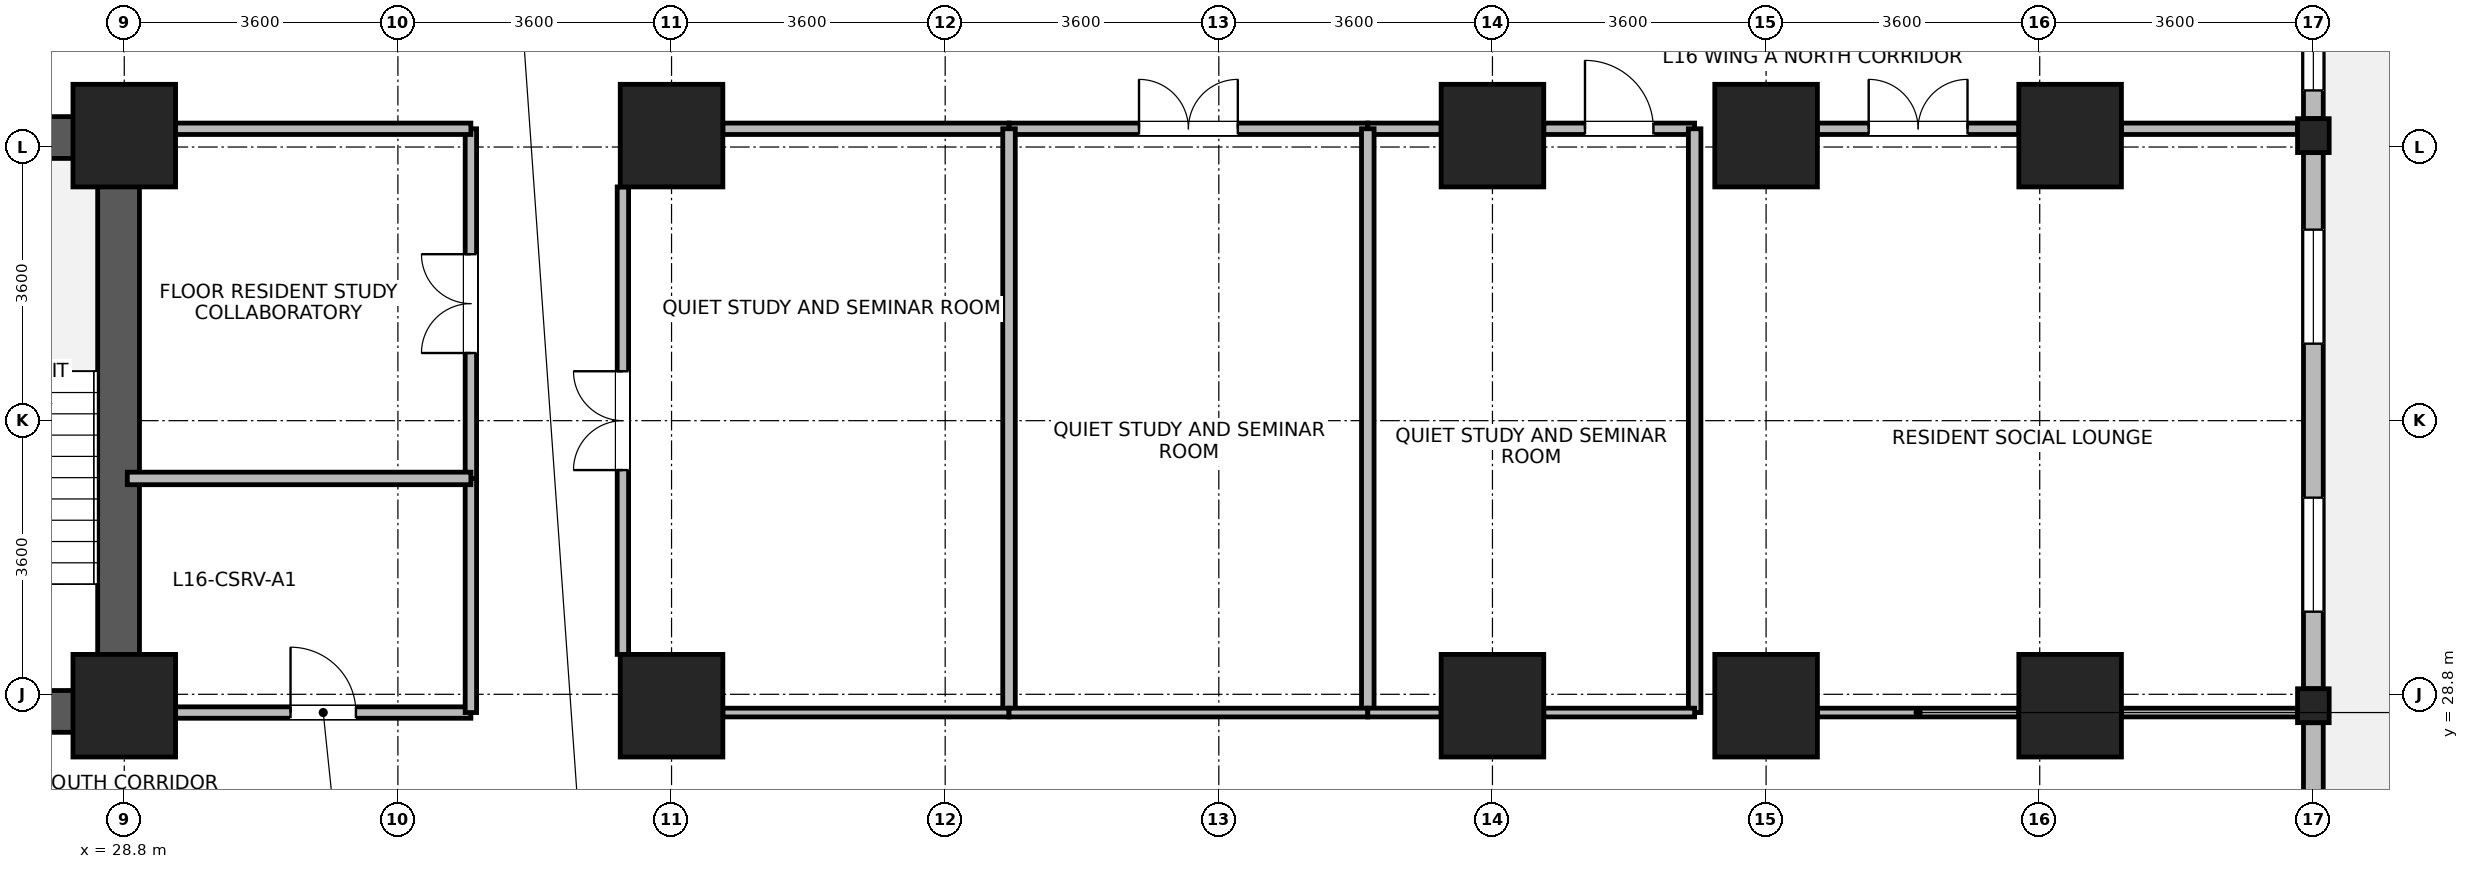
"""IFC4 building model, lengths in metres.
Left out: names, types, materials, properties, quantities, classifications, styles, units other than length and angle.
Written with IfcOpenShell. Run it as: python <this file> out.ifc"""

import sys

from ifc_helpers import new_model, si_unit, direction, frame, frame_2d, origin, origin_2d, place, context, subcontext, project, spatial, rectangle, i_section, extrude, source, transform, mapped, element, fill, save


model = new_model("IFC4")
c1 = context("Model", 3, precision=1e-05, world=origin(), true_north=direction((0.0, 1.0)))
c2 = subcontext(c1, "Body", "Model", "MODEL_VIEW")
j1 = project(units=[si_unit("LENGTHUNIT", "METRE"), si_unit("PLANEANGLEUNIT", "RADIAN")], contexts=[c1])
p1 = place(None, origin())
s1 = spatial("IfcSite", under=j1, at=p1, CompositionType="ELEMENT")
p2 = place(p1, origin())
s2 = spatial("IfcBuilding", under=s1, at=p2, CompositionType="ELEMENT")
p3 = place(p2, frame((0.0, 0.0, 66.0)))
s3 = spatial("IfcBuildingStorey", under=s2, at=p3, CompositionType="ELEMENT", Elevation=66.0)
p4 = place(p3, frame((28.725, 28.3, 0.0), z_axis=(0.0, 0.0, 1.0), x_axis=(0.0, 1.0, 0.0)))
e1 = element("IfcWall", 1, at=p4, inside=s3, PredefinedType="SHEAR", context=c2, shape_type="SweptSolid", body=[
    extrude(rectangle(XDim=8.1, YDim=0.55, at=frame_2d((4.05, 0.0))), origin(), (0.0, 0.0, 1.0), 3.45),
])
for number, where, z_axis, x_axis in (
    (2, (25.25, 28.575, 0.0), (0.0, 0.0, 1.0), (1.0, 0.0, 0.0)),
    (3, (25.25, 36.125, 0.0), (0.0, 0.0, 1.0), (1.0, 0.0, 0.0)),
):
    element("IfcWall", number, at=place(p3, frame(where, z_axis=z_axis, x_axis=x_axis)), inside=s3, PredefinedType="SHEAR", context=c2, shape_type="SweptSolid", body=[
        extrude(rectangle(XDim=3.2, YDim=0.55, at=frame_2d((1.6, 0.0))), origin(), (0.0, 0.0, 1.0), 3.45),
    ])
m1 = source(origin(), c2, "Body", "SweptSolid", [
    extrude(rectangle(XDim=1.35, YDim=1.35, at=origin_2d()), origin(), (0.0, 0.0, 1.0), 3.7),
])
for number, where, z_axis, x_axis in (
    (4, (28.8, 28.65, 0.0), (0.0, 0.0, 1.0), (1.0, 0.0, 0.0)),
    (5, (28.8, 36.15, 0.0), (0.0, 0.0, 1.0), (1.0, 0.0, 0.0)),
    (6, (36.0, 28.65, 0.0), (0.0, 0.0, 1.0), (1.0, 0.0, 0.0)),
    (7, (36.0, 36.15, 0.0), (0.0, 0.0, 1.0), (1.0, 0.0, 0.0)),
    (8, (46.8, 28.65, 0.0), (0.0, 0.0, 1.0), (1.0, 0.0, 0.0)),
    (9, (46.8, 36.15, 0.0), (0.0, 0.0, 1.0), (1.0, 0.0, 0.0)),
    (10, (50.4, 28.65, 0.0), (0.0, 0.0, 1.0), (1.0, 0.0, 0.0)),
    (11, (50.4, 36.15, 0.0), (0.0, 0.0, 1.0), (1.0, 0.0, 0.0)),
    (12, (54.4, 28.65, 0.0), (0.0, 0.0, 1.0), (1.0, 0.0, 0.0)),
    (13, (54.4, 36.15, 0.0), (0.0, 0.0, 1.0), (1.0, 0.0, 0.0)),
):
    element("IfcColumn", number, at=place(p3, frame(where, z_axis=z_axis, x_axis=x_axis)), inside=s3, PredefinedType="COLUMN", context=c2, shape_type="MappedRepresentation", body=[
        mapped(m1, transform((0.0, 0.0, 0.0), x_axis=(1.0, 0.0, 0.0), y_axis=(0.0, 1.0, 0.0), z_axis=(0.0, 0.0, 1.0), scale=1.0)),
    ])
m2 = source(origin(), c2, "Body", "SweptSolid", [
    extrude(i_section(OverallWidth=0.416, OverallDepth=0.446, WebThickness=0.029, FlangeThickness=0.04, FilletRadius=0.015, at=origin_2d()), origin(), (0.0, 0.0, 1.0), 3.7),
])
for number, where, z_axis, x_axis in (
    (14, (57.6, 28.65, 0.0), (0.0, 0.0, 1.0), (1.0, 0.0, 0.0)),
    (15, (57.6, 36.15, 0.0), (0.0, 0.0, 1.0), (1.0, 0.0, 0.0)),
):
    element("IfcColumn", number, at=place(p3, frame(where, z_axis=z_axis, x_axis=x_axis)), inside=s3, PredefinedType="COLUMN", context=c2, shape_type="MappedRepresentation", body=[
        mapped(m2, transform((0.0, 0.0, 0.0), x_axis=(1.0, 0.0, 0.0), y_axis=(0.0, 1.0, 0.0), z_axis=(0.0, 0.0, 1.0), scale=1.0)),
    ])
p5 = place(p3, frame((57.6, 28.426, 0.0), z_axis=(0.0, 0.0, 1.0), x_axis=(0.0, -1.0, 0.0)))
e16 = element("IfcWall", 16, at=p5, inside=s3, PredefinedType="STANDARD", context=c2, shape_type="SweptSolid", body=[
    extrude(rectangle(XDim=6.602, YDim=0.26, at=frame_2d((3.301, 0.0))), origin(), (0.0, 0.0, 1.0), 2.93),
])
p6 = place(p5, frame((4.201, 0.0, 0.85)))
e17 = element("IfcOpeningElement", 17, at=p6, cuts=e16, PredefinedType="OPENING", context=c2, shape_type="SweptSolid", body=[
    extrude(rectangle(XDim=1.5, YDim=1.85, at=frame_2d((0.75, 0.925))), frame((0.0, 0.14, 0.0), z_axis=(0.0, -1.0, 0.0), x_axis=(1.0, 0.0, 0.0)), (0.0, 0.0, 1.0), 0.28),
])
p7 = place(p5, frame((2.826, 0.0, 0.85)))
e18 = element("IfcOpeningElement", 18, at=p7, cuts=e16, PredefinedType="OPENING", context=c2, shape_type="SweptSolid", body=[
    extrude(rectangle(XDim=0.95, YDim=1.75, at=frame_2d((0.475, 0.875))), frame((0.0, 0.14, 0.0), z_axis=(0.0, -1.0, 0.0), x_axis=(1.0, 0.0, 0.0)), (0.0, 0.0, 1.0), 0.28),
])
p8 = place(p3, frame((57.6, 35.926, 0.0), z_axis=(0.0, 0.0, 1.0), x_axis=(0.0, -1.0, 0.0)))
e19 = element("IfcWall", 19, at=p8, inside=s3, PredefinedType="STANDARD", context=c2, shape_type="SweptSolid", body=[
    extrude(rectangle(XDim=7.052, YDim=0.26, at=frame_2d((3.526, 0.0))), origin(), (0.0, 0.0, 1.0), 2.93),
])
p9 = place(p8, frame((1.013, 0.0, 0.85)))
e20 = element("IfcOpeningElement", 20, at=p9, cuts=e19, PredefinedType="OPENING", context=c2, shape_type="SweptSolid", body=[
    extrude(rectangle(XDim=1.5, YDim=1.85, at=frame_2d((0.75, 0.925))), frame((0.0, 0.14, 0.0), z_axis=(0.0, -1.0, 0.0), x_axis=(1.0, 0.0, 0.0)), (0.0, 0.0, 1.0), 0.28),
])
p10 = place(p8, frame((4.539, 0.0, 0.85)))
e21 = element("IfcOpeningElement", 21, at=p10, cuts=e19, PredefinedType="OPENING", context=c2, shape_type="SweptSolid", body=[
    extrude(rectangle(XDim=1.5, YDim=1.85, at=frame_2d((0.75, 0.925))), frame((0.0, 0.14, 0.0), z_axis=(0.0, -1.0, 0.0), x_axis=(1.0, 0.0, 0.0)), (0.0, 0.0, 1.0), 0.28),
])
p11 = place(p3, frame((57.6, 39.73, 0.0), z_axis=(0.0, 0.0, 1.0), x_axis=(0.0, -1.0, 0.0)))
e22 = element("IfcWall", 22, at=p11, inside=s3, PredefinedType="STANDARD", context=c2, shape_type="SweptSolid", body=[
    extrude(rectangle(XDim=3.356, YDim=0.26, at=frame_2d((1.678, 0.0))), origin(), (0.0, 0.0, 1.0), 3.43),
])
p12 = place(p11, frame((2.035, 0.0, 0.85)))
e23 = element("IfcOpeningElement", 23, at=p12, cuts=e22, PredefinedType="OPENING", context=c2, shape_type="SweptSolid", body=[
    extrude(rectangle(XDim=0.95, YDim=1.75, at=frame_2d((0.475, 0.875))), frame((0.0, 0.14, 0.0), z_axis=(0.0, -1.0, 0.0), x_axis=(1.0, 0.0, 0.0)), (0.0, 0.0, 1.0), 0.28),
])
p13 = place(p11, frame((0.263, 0.0, 0.85)))
e24 = element("IfcOpeningElement", 24, at=p13, cuts=e22, PredefinedType="OPENING", context=c2, shape_type="SweptSolid", body=[
    extrude(rectangle(XDim=0.95, YDim=1.75, at=frame_2d((0.475, 0.875))), frame((0.0, 0.14, 0.0), z_axis=(0.0, -1.0, 0.0), x_axis=(1.0, 0.0, 0.0)), (0.0, 0.0, 1.0), 0.28),
])
p14 = place(p3, frame((51.075, 36.24, 0.0), z_axis=(0.0, 0.0, 1.0), x_axis=(1.0, 0.0, 0.0)))
e25 = element("IfcWall", 25, at=p14, inside=s3, PredefinedType="PARTITIONING", context=c2, shape_type="SweptSolid", body=[
    extrude(rectangle(XDim=2.65, YDim=0.15, at=frame_2d((1.325, 0.0))), origin(), (0.0, 0.0, 1.0), 2.78),
])
p15 = place(p14, frame((0.675, 0.0, 0.0)))
e26 = element("IfcOpeningElement", 26, at=p15, cuts=e25, PredefinedType="OPENING", context=c2, shape_type="SweptSolid", body=[
    extrude(rectangle(XDim=1.3, YDim=2.12, at=frame_2d((0.65, 1.06))), frame((0.0, 0.085, 0.0), z_axis=(0.0, -1.0, 0.0), x_axis=(1.0, 0.0, 0.0)), (0.0, 0.0, 1.0), 0.17),
])
p16 = place(p3, frame((55.075, 36.24, 0.0), z_axis=(0.0, 0.0, 1.0), x_axis=(1.0, 0.0, 0.0)))
e27 = element("IfcWall", 27, at=p16, inside=s3, PredefinedType="PARTITIONING", context=c2, shape_type="SweptSolid", body=[
    extrude(rectangle(XDim=2.317, YDim=0.15, at=frame_2d((1.159, 0.0))), origin(), (0.0, 0.0, 1.0), 2.78),
])
p17 = place(p3, frame((35.36, 29.325, 0.0), z_axis=(0.0, 0.0, 1.0), x_axis=(0.0, 1.0, 0.0)))
e28 = element("IfcWall", 28, at=p17, inside=s3, PredefinedType="PARTITIONING", context=c2, shape_type="SweptSolid", body=[
    extrude(rectangle(XDim=6.15, YDim=0.15, at=frame_2d((3.075, 0.0))), origin(), (0.0, 0.0, 1.0), 3.43),
])
p18 = place(p17, frame((2.425, 0.0, 0.0)))
e29 = element("IfcOpeningElement", 29, at=p18, cuts=e28, PredefinedType="OPENING", context=c2, shape_type="SweptSolid", body=[
    extrude(rectangle(XDim=1.3, YDim=2.12, at=frame_2d((0.65, 1.06))), frame((0.0, 0.085, 0.0), z_axis=(0.0, -1.0, 0.0), x_axis=(1.0, 0.0, 0.0)), (0.0, 0.0, 1.0), 0.17),
])
p19 = place(p3, frame((36.675, 36.24, 0.0), z_axis=(0.0, 0.0, 1.0), x_axis=(1.0, 0.0, 0.0)))
e30 = element("IfcWall", 30, at=p19, inside=s3, PredefinedType="PARTITIONING", context=c2, shape_type="SweptSolid", body=[
    extrude(rectangle(XDim=3.765, YDim=0.15, at=frame_2d((1.882, 0.0))), origin(), (0.0, 0.0, 1.0), 2.78),
])
p20 = place(p3, frame((40.44, 36.24, 0.0), z_axis=(0.0, 0.0, 1.0), x_axis=(1.0, 0.0, 0.0)))
e31 = element("IfcWall", 31, at=p20, inside=s3, PredefinedType="PARTITIONING", context=c2, shape_type="SweptSolid", body=[
    extrude(rectangle(XDim=4.72, YDim=0.15, at=frame_2d((2.36, 0.0))), origin(), (0.0, 0.0, 1.0), 2.78),
])
p21 = place(p20, frame((1.71, 0.0, 0.0)))
e32 = element("IfcOpeningElement", 32, at=p21, cuts=e31, PredefinedType="OPENING", context=c2, shape_type="SweptSolid", body=[
    extrude(rectangle(XDim=1.3, YDim=2.12, at=frame_2d((0.65, 1.06))), frame((0.0, 0.085, 0.0), z_axis=(0.0, -1.0, 0.0), x_axis=(1.0, 0.0, 0.0)), (0.0, 0.0, 1.0), 0.17),
])
p22 = place(p3, frame((33.36, 31.64, 0.0), z_axis=(0.0, 0.0, 1.0), x_axis=(0.0, 1.0, 0.0)))
e33 = element("IfcWall", 33, at=p22, inside=s3, PredefinedType="PARTITIONING", context=c2, shape_type="SweptSolid", body=[
    extrude(rectangle(XDim=4.6, YDim=0.15, at=frame_2d((2.3, 0.0))), origin(), (0.0, 0.0, 1.0), 3.43),
])
p23 = place(p22, frame((1.65, 0.0, 0.0)))
e34 = element("IfcOpeningElement", 34, at=p23, cuts=e33, PredefinedType="OPENING", context=c2, shape_type="SweptSolid", body=[
    extrude(rectangle(XDim=1.3, YDim=2.12, at=frame_2d((0.65, 1.06))), frame((0.0, 0.085, 0.0), z_axis=(0.0, -1.0, 0.0), x_axis=(1.0, 0.0, 0.0)), (0.0, 0.0, 1.0), 0.17),
])
p24 = place(p3, frame((29.475, 28.56, 0.0), z_axis=(0.0, 0.0, 1.0), x_axis=(1.0, 0.0, 0.0)))
e35 = element("IfcWall", 35, at=p24, inside=s3, PredefinedType="PARTITIONING", context=c2, shape_type="SweptSolid", body=[
    extrude(rectangle(XDim=3.885, YDim=0.15, at=frame_2d((1.942, 0.0))), origin(), (0.0, 0.0, 1.0), 2.78),
])
p25 = place(p24, frame((1.512, 0.0, 0.0)))
e36 = element("IfcOpeningElement", 36, at=p25, cuts=e35, PredefinedType="OPENING", context=c2, shape_type="SweptSolid", body=[
    extrude(rectangle(XDim=0.86, YDim=2.02, at=frame_2d((0.43, 1.01))), frame((0.0, 0.085, 0.0), z_axis=(0.0, -1.0, 0.0), x_axis=(1.0, 0.0, 0.0)), (0.0, 0.0, 1.0), 0.17),
])
p26 = place(p3, frame((29.475, 36.24, 0.0), z_axis=(0.0, 0.0, 1.0), x_axis=(1.0, 0.0, 0.0)))
e37 = element("IfcWall", 37, at=p26, inside=s3, PredefinedType="PARTITIONING", context=c2, shape_type="SweptSolid", body=[
    extrude(rectangle(XDim=3.885, YDim=0.15, at=frame_2d((1.942, 0.0))), origin(), (0.0, 0.0, 1.0), 2.78),
])
p27 = place(p3, frame((45.16, 36.24, 0.0), z_axis=(0.0, 0.0, 1.0), x_axis=(1.0, 0.0, 0.0)))
e38 = element("IfcWall", 38, at=p27, inside=s3, PredefinedType="PARTITIONING", context=c2, shape_type="SweptSolid", body=[
    extrude(rectangle(XDim=0.965, YDim=0.15, at=frame_2d((0.482, 0.0))), origin(), (0.0, 0.0, 1.0), 2.78),
])
p28 = place(p3, frame((47.475, 36.24, 0.0), z_axis=(0.0, 0.0, 1.0), x_axis=(1.0, 0.0, 0.0)))
e39 = element("IfcWall", 39, at=p28, inside=s3, PredefinedType="PARTITIONING", context=c2, shape_type="SweptSolid", body=[
    extrude(rectangle(XDim=1.985, YDim=0.15, at=frame_2d((0.992, 0.0))), origin(), (0.0, 0.0, 1.0), 2.78),
])
p29 = place(p28, frame((0.542, 0.0, 0.0)))
e40 = element("IfcOpeningElement", 40, at=p29, cuts=e39, PredefinedType="OPENING", context=c2, shape_type="SweptSolid", body=[
    extrude(rectangle(XDim=0.9, YDim=2.08, at=frame_2d((0.45, 1.04))), frame((0.0, 0.085, 0.0), z_axis=(0.0, -1.0, 0.0), x_axis=(1.0, 0.0, 0.0)), (0.0, 0.0, 1.0), 0.17),
])
p30 = place(p3, frame((33.36, 28.56, 0.0), z_axis=(0.0, 0.0, 1.0), x_axis=(0.0, 1.0, 0.0)))
e41 = element("IfcWall", 41, at=p30, inside=s3, PredefinedType="PARTITIONING", context=c2, shape_type="SweptSolid", body=[
    extrude(rectangle(XDim=3.08, YDim=0.15, at=frame_2d((1.54, 0.0))), origin(), (0.0, 0.0, 1.0), 3.43),
])
p31 = place(p3, frame((51.075, 28.56, 0.0), z_axis=(0.0, 0.0, 1.0), x_axis=(1.0, 0.0, 0.0)))
e42 = element("IfcWall", 42, at=p31, inside=s3, PredefinedType="PARTITIONING", context=c2, shape_type="SweptSolid", body=[
    extrude(rectangle(XDim=2.65, YDim=0.115, at=frame_2d((1.325, 0.0))), origin(), (0.0, 0.0, 1.0), 2.78),
])
p32 = place(p3, frame((55.075, 28.56, 0.0), z_axis=(0.0, 0.0, 1.0), x_axis=(1.0, 0.0, 0.0)))
e43 = element("IfcWall", 43, at=p32, inside=s3, PredefinedType="PARTITIONING", context=c2, shape_type="SweptSolid", body=[
    extrude(rectangle(XDim=2.317, YDim=0.115, at=frame_2d((1.159, 0.0))), origin(), (0.0, 0.0, 1.0), 2.78),
])
for number, where, z_axis, x_axis in (
    (44, (40.44, 28.56, 0.0), (0.0, 0.0, 1.0), (0.0, 1.0, 0.0)),
    (45, (45.16, 28.56, 0.0), (0.0, 0.0, 1.0), (0.0, 1.0, 0.0)),
    (46, (49.46, 28.56, 0.0), (0.0, 0.0, 1.0), (0.0, 1.0, 0.0)),
):
    element("IfcWall", number, at=place(p3, frame(where, z_axis=z_axis, x_axis=x_axis)), inside=s3, PredefinedType="PARTITIONING", context=c2, shape_type="SweptSolid", body=[
        extrude(rectangle(XDim=7.68, YDim=0.165, at=frame_2d((3.84, 0.0))), origin(), (0.0, 0.0, 1.0), 3.43),
    ])
p33 = place(p3, frame((36.675, 28.56, 0.0), z_axis=(0.0, 0.0, 1.0), x_axis=(1.0, 0.0, 0.0)))
e47 = element("IfcWall", 47, at=p33, inside=s3, PredefinedType="PARTITIONING", context=c2, shape_type="SweptSolid", body=[
    extrude(rectangle(XDim=3.765, YDim=0.115, at=frame_2d((1.882, 0.0))), origin(), (0.0, 0.0, 1.0), 2.78),
])
p34 = place(p3, frame((40.44, 28.56, 0.0), z_axis=(0.0, 0.0, 1.0), x_axis=(1.0, 0.0, 0.0)))
e48 = element("IfcWall", 48, at=p34, inside=s3, PredefinedType="PARTITIONING", context=c2, shape_type="SweptSolid", body=[
    extrude(rectangle(XDim=4.72, YDim=0.115, at=frame_2d((2.36, 0.0))), origin(), (0.0, 0.0, 1.0), 2.78),
])
p35 = place(p3, frame((28.84, 31.64, 0.0), z_axis=(0.0, 0.0, 1.0), x_axis=(1.0, 0.0, 0.0)))
e49 = element("IfcWall", 49, at=p35, inside=s3, PredefinedType="PARTITIONING", context=c2, shape_type="SweptSolid", body=[
    extrude(rectangle(XDim=4.52, YDim=0.165, at=frame_2d((2.26, 0.0))), origin(), (0.0, 0.0, 1.0), 3.43),
])
p36 = place(p3, frame((45.16, 28.56, 0.0), z_axis=(0.0, 0.0, 1.0), x_axis=(1.0, 0.0, 0.0)))
e50 = element("IfcWall", 50, at=p36, inside=s3, PredefinedType="PARTITIONING", context=c2, shape_type="SweptSolid", body=[
    extrude(rectangle(XDim=0.965, YDim=0.115, at=frame_2d((0.482, 0.0))), origin(), (0.0, 0.0, 1.0), 2.78),
])
p37 = place(p3, frame((47.475, 28.56, 0.0), z_axis=(0.0, 0.0, 1.0), x_axis=(1.0, 0.0, 0.0)))
e51 = element("IfcWall", 51, at=p37, inside=s3, PredefinedType="PARTITIONING", context=c2, shape_type="SweptSolid", body=[
    extrude(rectangle(XDim=1.985, YDim=0.115, at=frame_2d((0.992, 0.0))), origin(), (0.0, 0.0, 1.0), 2.78),
])
p38 = place(p9, origin())
e52 = element("IfcWindow", 52, at=p38, inside=s3, PartitioningType="SINGLE_PANEL", PredefinedType="WINDOW", context=c2, shape_type="SweptSolid", body=[
    extrude(rectangle(XDim=1.5, YDim=1.85, at=frame_2d((0.75, 0.925))), frame((0.0, 0.03, 0.0), z_axis=(0.0, -1.0, 0.0), x_axis=(1.0, 0.0, 0.0)), (0.0, 0.0, 1.0), 0.06),
])
fill(e20, e52)
p39 = place(p10, origin())
e53 = element("IfcWindow", 53, at=p39, inside=s3, PartitioningType="SINGLE_PANEL", PredefinedType="WINDOW", context=c2, shape_type="SweptSolid", body=[
    extrude(rectangle(XDim=1.5, YDim=1.85, at=frame_2d((0.75, 0.925))), frame((0.0, 0.03, 0.0), z_axis=(0.0, -1.0, 0.0), x_axis=(1.0, 0.0, 0.0)), (0.0, 0.0, 1.0), 0.06),
])
fill(e21, e53)
p40 = place(p12, origin())
e54 = element("IfcWindow", 54, at=p40, inside=s3, PartitioningType="SINGLE_PANEL", PredefinedType="WINDOW", context=c2, shape_type="SweptSolid", body=[
    extrude(rectangle(XDim=0.95, YDim=1.75, at=frame_2d((0.475, 0.875))), frame((0.0, 0.03, 0.0), z_axis=(0.0, -1.0, 0.0), x_axis=(1.0, 0.0, 0.0)), (0.0, 0.0, 1.0), 0.06),
])
fill(e23, e54)
p41 = place(p15, origin())
e55 = element("IfcDoor", 55, at=p41, inside=s3, OperationType="DOUBLE_DOOR_SINGLE_SWING", PredefinedType="DOOR", context=c2, shape_type="SweptSolid", body=[
    extrude(rectangle(XDim=1.3, YDim=2.12, at=frame_2d((0.65, 1.06))), frame((0.0, 0.025, 0.0), z_axis=(0.0, -1.0, 0.0), x_axis=(1.0, 0.0, 0.0)), (0.0, 0.0, 1.0), 0.05),
])
fill(e26, e55)
p42 = place(p18, origin())
e56 = element("IfcDoor", 56, at=p42, inside=s3, OperationType="DOUBLE_DOOR_SINGLE_SWING", PredefinedType="DOOR", context=c2, shape_type="SweptSolid", body=[
    extrude(rectangle(XDim=1.3, YDim=2.12, at=frame_2d((0.65, 1.06))), frame((0.0, 0.025, 0.0), z_axis=(0.0, -1.0, 0.0), x_axis=(1.0, 0.0, 0.0)), (0.0, 0.0, 1.0), 0.05),
])
fill(e29, e56)
p43 = place(p21, origin())
e57 = element("IfcDoor", 57, at=p43, inside=s3, OperationType="DOUBLE_DOOR_SINGLE_SWING", PredefinedType="DOOR", context=c2, shape_type="SweptSolid", body=[
    extrude(rectangle(XDim=1.3, YDim=2.12, at=frame_2d((0.65, 1.06))), frame((0.0, 0.025, 0.0), z_axis=(0.0, -1.0, 0.0), x_axis=(1.0, 0.0, 0.0)), (0.0, 0.0, 1.0), 0.05),
])
fill(e32, e57)
p44 = place(p23, origin())
e58 = element("IfcDoor", 58, at=p44, inside=s3, OperationType="DOUBLE_DOOR_SINGLE_SWING", PredefinedType="DOOR", context=c2, shape_type="SweptSolid", body=[
    extrude(rectangle(XDim=1.3, YDim=2.12, at=frame_2d((0.65, 1.06))), frame((0.0, 0.025, 0.0), z_axis=(0.0, -1.0, 0.0), x_axis=(1.0, 0.0, 0.0)), (0.0, 0.0, 1.0), 0.05),
])
fill(e34, e58)
p45 = place(p25, origin())
e59 = element("IfcDoor", 59, at=p45, inside=s3, OperationType="SINGLE_SWING_LEFT", PredefinedType="DOOR", context=c2, shape_type="SweptSolid", body=[
    extrude(rectangle(XDim=0.86, YDim=2.02, at=frame_2d((0.43, 1.01))), frame((0.0, 0.025, 0.0), z_axis=(0.0, -1.0, 0.0), x_axis=(1.0, 0.0, 0.0)), (0.0, 0.0, 1.0), 0.05),
])
fill(e36, e59)
p46 = place(p29, origin())
e60 = element("IfcDoor", 60, at=p46, inside=s3, OperationType="SINGLE_SWING_LEFT", PredefinedType="DOOR", context=c2, shape_type="SweptSolid", body=[
    extrude(rectangle(XDim=0.9, YDim=2.08, at=frame_2d((0.45, 1.04))), frame((0.0, 0.025, 0.0), z_axis=(0.0, -1.0, 0.0), x_axis=(1.0, 0.0, 0.0)), (0.0, 0.0, 1.0), 0.05),
])
fill(e40, e60)
save(model, sys.argv[1])
